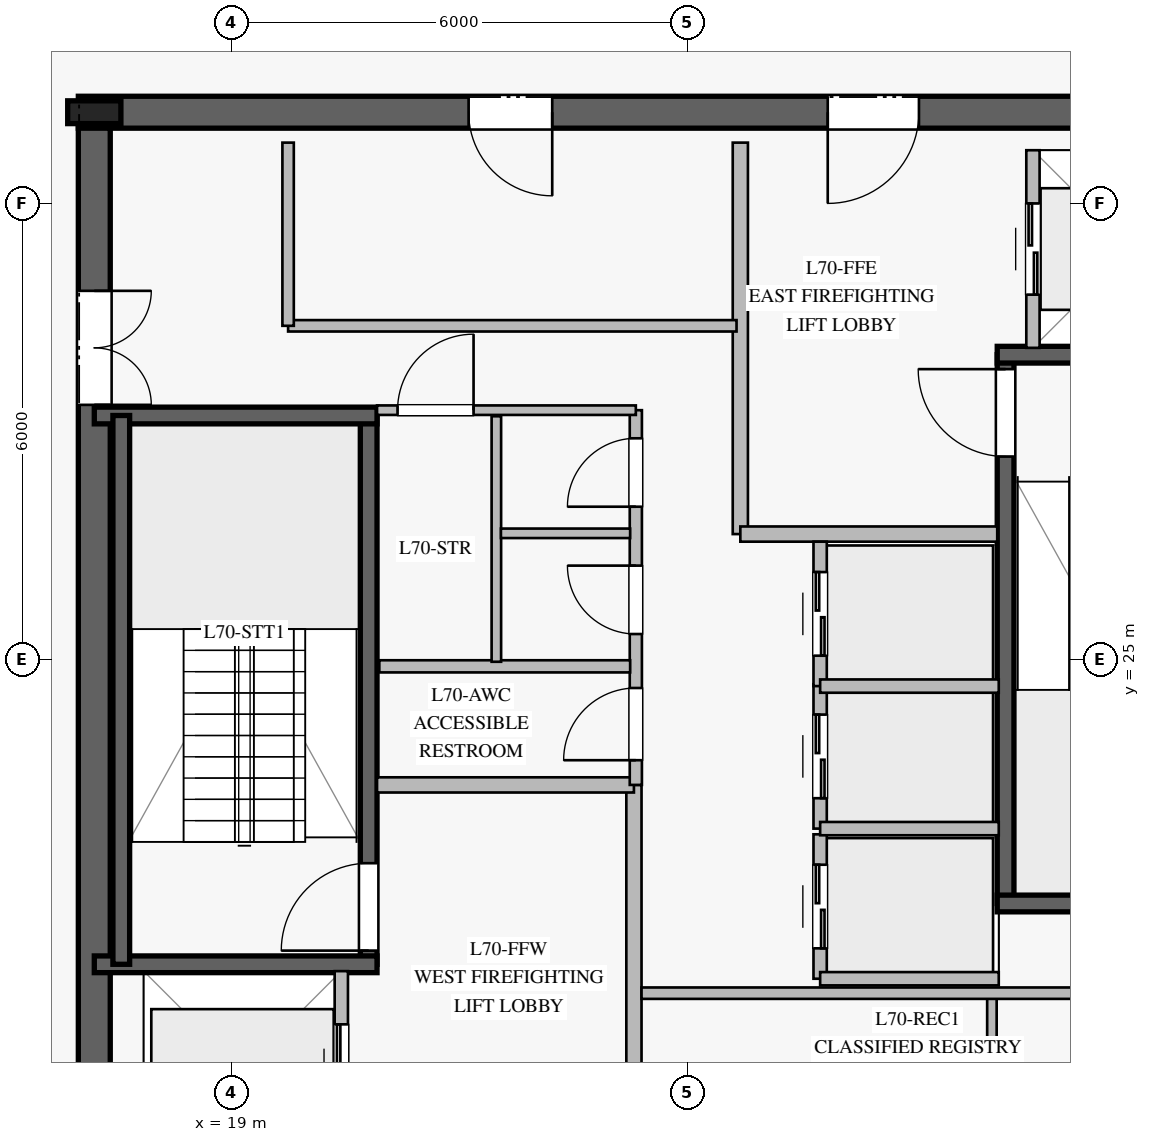
"""IFC4 building model, lengths in metres.
Left out: names, types, materials, properties, quantities, classifications, styles, units other than length and angle.
Written with IfcOpenShell. Run it as: python <this file> out.ifc"""

import sys

from ifc_helpers import new_model, si_unit, direction, frame, frame_2d, origin, origin_2d, place, context, subcontext, project, spatial, rectangle, i_section, extrude, element, fill, save


model = new_model("IFC4")
c1 = context("Model", 3, precision=1e-05, world=origin(), true_north=direction((0.0, 1.0)))
c2 = subcontext(c1, "Body", "Model", "MODEL_VIEW")
j1 = project(units=[si_unit("LENGTHUNIT", "METRE"), si_unit("PLANEANGLEUNIT", "RADIAN")], contexts=[c1])
p1 = place(None, origin())
s1 = spatial("IfcSite", under=j1, at=p1, CompositionType="ELEMENT")
p2 = place(p1, origin())
s2 = spatial("IfcBuilding", under=s1, at=p2, CompositionType="ELEMENT")
p3 = place(p2, frame((0.0, 0.0, 290.2)))
s3 = spatial("IfcBuildingStorey", under=s2, at=p3, CompositionType="ELEMENT", Elevation=290.2)
p4 = place(p3, frame((33.01, 32.2, 0.0), z_axis=(0.0, 0.0, 1.0), x_axis=(-1.0, 0.0, 0.0)))
e1 = element("IfcWall", 1, at=p4, inside=s3, PredefinedType="SHEAR", context=c2, shape_type="SweptSolid", body=[
    extrude(rectangle(XDim=16.02, YDim=0.42, at=frame_2d((8.01, 0.0))), origin(), (0.0, 0.0, 1.0), 3.78),
])
p5 = place(p4, frame((4.96, 0.0, 0.0)))
e2 = element("IfcOpeningElement", 2, at=p5, cuts=e1, PredefinedType="OPENING", context=c2, shape_type="SweptSolid", body=[
    extrude(rectangle(XDim=1.2, YDim=2.25, at=frame_2d((0.6, 1.125))), frame((0.0, 0.22, 0.0), z_axis=(0.0, -1.0, 0.0), x_axis=(1.0, 0.0, 0.0)), (0.0, 0.0, 1.0), 0.44),
])
p6 = place(p4, frame((9.785, 0.0, 0.0)))
e3 = element("IfcOpeningElement", 3, at=p6, cuts=e1, PredefinedType="OPENING", context=c2, shape_type="SweptSolid", body=[
    extrude(rectangle(XDim=1.1, YDim=2.2, at=frame_2d((0.55, 1.1))), frame((0.0, 0.22, 0.0), z_axis=(0.0, -1.0, 0.0), x_axis=(1.0, 0.0, 0.0)), (0.0, 0.0, 1.0), 0.44),
])
p7 = place(p3, frame((17.2, 31.99, 0.0), z_axis=(0.0, 0.0, 1.0), x_axis=(0.0, -1.0, 0.0)))
e4 = element("IfcWall", 4, at=p7, inside=s3, PredefinedType="SHEAR", context=c2, shape_type="SweptSolid", body=[
    extrude(rectangle(XDim=13.98, YDim=0.42, at=frame_2d((6.99, 0.0))), origin(), (0.0, 0.0, 1.0), 3.78),
])
p8 = place(p7, frame((2.14, 0.0, 0.0)))
e5 = element("IfcOpeningElement", 5, at=p8, cuts=e4, PredefinedType="OPENING", context=c2, shape_type="SweptSolid", body=[
    extrude(rectangle(XDim=1.5, YDim=2.2, at=frame_2d((0.75, 1.1))), frame((0.0, 0.22, 0.0), z_axis=(0.0, -1.0, 0.0), x_axis=(1.0, 0.0, 0.0)), (0.0, 0.0, 1.0), 0.44),
])
p9 = place(p3, frame((17.2, 32.2, 0.0), z_axis=(0.0, 0.0, 1.0), x_axis=(1.0, 0.0, 0.0)))
e6 = element("IfcColumn", 6, at=p9, inside=s3, PredefinedType="COLUMN", context=c2, shape_type="SweptSolid", body=[
    extrude(i_section(OverallWidth=0.3, OverallDepth=0.7, WebThickness=0.017, FlangeThickness=0.032, at=origin_2d()), origin(), (0.0, 0.0, 1.0), 4.0),
])
p10 = place(p3, frame((20.81, 20.99, 0.0), z_axis=(0.0, 0.0, 1.0), x_axis=(0.0, 1.0, 0.0)))
e7 = element("IfcWall", 7, at=p10, inside=s3, PredefinedType="SOLIDWALL", context=c2, shape_type="SweptSolid", body=[
    extrude(rectangle(XDim=7.22, YDim=0.22, at=frame_2d((3.61, 0.0))), origin(), (0.0, 0.0, 1.0), 3.78),
])
p11 = place(p10, frame((0.18, 0.0, 0.0)))
e8 = element("IfcOpeningElement", 8, at=p11, cuts=e7, PredefinedType="OPENING", context=c2, shape_type="SweptSolid", body=[
    extrude(rectangle(XDim=1.15, YDim=2.2, at=frame_2d((0.575, 1.1))), frame((0.0, 0.12, 0.0), z_axis=(0.0, -1.0, 0.0), x_axis=(1.0, 0.0, 0.0)), (0.0, 0.0, 1.0), 0.24),
])
for number, where, z_axis, x_axis in (
    (9, (17.2, 20.99, 0.0), (0.0, 0.0, 1.0), (1.0, 0.0, 0.0)),
    (10, (17.2, 28.21, 0.0), (0.0, 0.0, 1.0), (1.0, 0.0, 0.0)),
):
    element("IfcWall", number, at=place(p3, frame(where, z_axis=z_axis, x_axis=x_axis)), inside=s3, PredefinedType="SOLIDWALL", context=c2, shape_type="SweptSolid", body=[
        extrude(rectangle(XDim=3.72, YDim=0.22, at=frame_2d((1.86, 0.0))), origin(), (0.0, 0.0, 1.0), 3.78),
    ])
p12 = place(p3, frame((17.555, 28.21, 0.0), z_axis=(0.0, 0.0, 1.0), x_axis=(0.0, -1.0, 0.0)))
e11 = element("IfcWall", 11, at=p12, inside=s3, PredefinedType="SOLIDWALL", context=c2, shape_type="SweptSolid", body=[
    extrude(rectangle(XDim=7.22, YDim=0.22, at=frame_2d((3.61, 0.0))), origin(), (0.0, 0.0, 1.0), 3.78),
])
p13 = place(p3, frame((29.19, 21.79, 0.0), z_axis=(0.0, 0.0, 1.0), x_axis=(0.0, 1.0, 0.0)))
e12 = element("IfcWall", 12, at=p13, inside=s3, PredefinedType="SOLIDWALL", context=c2, shape_type="SweptSolid", body=[
    extrude(rectangle(XDim=7.22, YDim=0.22, at=frame_2d((3.61, 0.0))), origin(), (0.0, 0.0, 1.0), 3.78),
])
p14 = place(p13, frame((5.88, 0.0, 0.0)))
e13 = element("IfcOpeningElement", 13, at=p14, cuts=e12, PredefinedType="OPENING", context=c2, shape_type="SweptSolid", body=[
    extrude(rectangle(XDim=1.15, YDim=2.2, at=frame_2d((0.575, 1.1))), frame((0.0, 0.12, 0.0), z_axis=(0.0, -1.0, 0.0), x_axis=(1.0, 0.0, 0.0)), (0.0, 0.0, 1.0), 0.24),
])
for number, where, z_axis, x_axis in (
    (14, (29.08, 21.79, 0.0), (0.0, 0.0, 1.0), (1.0, 0.0, 0.0)),
    (15, (29.08, 29.01, 0.0), (0.0, 0.0, 1.0), (1.0, 0.0, 0.0)),
):
    element("IfcWall", number, at=place(p3, frame(where, z_axis=z_axis, x_axis=x_axis)), inside=s3, PredefinedType="SOLIDWALL", context=c2, shape_type="SweptSolid", body=[
        extrude(rectangle(XDim=3.72, YDim=0.22, at=frame_2d((1.86, 0.0))), origin(), (0.0, 0.0, 1.0), 3.78),
    ])
p15 = place(p3, frame((24.3, 18.2, 0.0), z_axis=(0.0, 0.0, 1.0), x_axis=(0.0, 1.0, 0.0)))
e16 = element("IfcWall", 16, at=p15, inside=s3, PredefinedType="PARTITIONING", context=c2, shape_type="SweptSolid", body=[
    extrude(rectangle(XDim=5.15, YDim=0.2, at=frame_2d((2.575, 0.0))), origin(), (0.0, 0.0, 1.0), 3.78),
])
p16 = place(p3, frame((20.92, 23.35, 0.0), z_axis=(0.0, 0.0, 1.0), x_axis=(1.0, 0.0, 0.0)))
e17 = element("IfcWall", 17, at=p16, inside=s3, PredefinedType="PARTITIONING", context=c2, shape_type="SweptSolid", body=[
    extrude(rectangle(XDim=3.38, YDim=0.2, at=frame_2d((1.69, 0.0))), origin(), (0.0, 0.0, 1.0), 3.78),
])
p17 = place(p3, frame((25.7, 26.65, 0.0), z_axis=(0.0, 0.0, 1.0), x_axis=(0.0, 1.0, 0.0)))
e18 = element("IfcWall", 18, at=p17, inside=s3, PredefinedType="PARTITIONING", context=c2, shape_type="SweptSolid", body=[
    extrude(rectangle(XDim=5.15, YDim=0.2, at=frame_2d((2.575, 0.0))), origin(), (0.0, 0.0, 1.0), 3.78),
])
p18 = place(p3, frame((25.7, 26.65, 0.0), z_axis=(0.0, 0.0, 1.0), x_axis=(1.0, 0.0, 0.0)))
e19 = element("IfcWall", 19, at=p18, inside=s3, PredefinedType="PARTITIONING", context=c2, shape_type="SweptSolid", body=[
    extrude(rectangle(XDim=3.38, YDim=0.2, at=frame_2d((1.69, 0.0))), origin(), (0.0, 0.0, 1.0), 3.78),
])
p19 = place(p3, frame((24.325, 23.35, 0.0), z_axis=(0.0, 0.0, 1.0), x_axis=(0.0, 1.0, 0.0)))
e20 = element("IfcWall", 20, at=p19, inside=s3, PredefinedType="PLUMBINGWALL", context=c2, shape_type="SweptSolid", body=[
    extrude(rectangle(XDim=4.93, YDim=0.16, at=frame_2d((2.465, 0.0))), origin(), (0.0, 0.0, 1.0), 3.78),
])
p20 = place(p19, frame((0.325, 0.0, 0.0)))
e21 = element("IfcOpeningElement", 21, at=p20, cuts=e20, PredefinedType="OPENING", context=c2, shape_type="SweptSolid", body=[
    extrude(rectangle(XDim=0.95, YDim=2.1, at=frame_2d((0.475, 1.05))), frame((0.0, 0.09, 0.0), z_axis=(0.0, -1.0, 0.0), x_axis=(1.0, 0.0, 0.0)), (0.0, 0.0, 1.0), 0.18),
])
p21 = place(p19, frame((1.985, 0.0, 0.0)))
e22 = element("IfcOpeningElement", 22, at=p21, cuts=e20, PredefinedType="OPENING", context=c2, shape_type="SweptSolid", body=[
    extrude(rectangle(XDim=0.9, YDim=2.1, at=frame_2d((0.45, 1.05))), frame((0.0, 0.09, 0.0), z_axis=(0.0, -1.0, 0.0), x_axis=(1.0, 0.0, 0.0)), (0.0, 0.0, 1.0), 0.18),
])
p22 = place(p19, frame((3.66, 0.0, 0.0)))
e23 = element("IfcOpeningElement", 23, at=p22, cuts=e20, PredefinedType="OPENING", context=c2, shape_type="SweptSolid", body=[
    extrude(rectangle(XDim=0.9, YDim=2.1, at=frame_2d((0.45, 1.05))), frame((0.0, 0.09, 0.0), z_axis=(0.0, -1.0, 0.0), x_axis=(1.0, 0.0, 0.0)), (0.0, 0.0, 1.0), 0.18),
])
p23 = place(p3, frame((20.92, 28.28, 0.0), z_axis=(0.0, 0.0, 1.0), x_axis=(1.0, 0.0, 0.0)))
e24 = element("IfcWall", 24, at=p23, inside=s3, PredefinedType="PARTITIONING", context=c2, shape_type="SweptSolid", body=[
    extrude(rectangle(XDim=3.405, YDim=0.125, at=frame_2d((1.703, 0.0))), origin(), (0.0, 0.0, 1.0), 3.78),
])
p24 = place(p23, frame((0.27, 0.0, 0.0)))
e25 = element("IfcOpeningElement", 25, at=p24, cuts=e24, PredefinedType="OPENING", context=c2, shape_type="SweptSolid", body=[
    extrude(rectangle(XDim=1.0, YDim=2.15, at=frame_2d((0.5, 1.075))), frame((0.0, 0.073, 0.0), z_axis=(0.0, -1.0, 0.0), x_axis=(1.0, 0.0, 0.0)), (0.0, 0.0, 1.0), 0.145),
])
p25 = place(p3, frame((29.01, 18.01, 0.0), z_axis=(0.0, 0.0, 1.0), x_axis=(0.0, 1.0, 0.0)))
e26 = element("IfcWall", 26, at=p25, inside=s3, PredefinedType="PARTITIONING", context=c2, shape_type="SweptSolid", body=[
    extrude(rectangle(XDim=2.54, YDim=0.125, at=frame_2d((1.27, 0.0))), origin(), (0.0, 0.0, 1.0), 3.78),
])
p26 = place(p3, frame((20.95, 24.91, 0.0), z_axis=(0.0, 0.0, 1.0), x_axis=(1.0, 0.0, 0.0)))
e27 = element("IfcWall", 27, at=p26, inside=s3, PredefinedType="PLUMBINGWALL", context=c2, shape_type="SweptSolid", body=[
    extrude(rectangle(XDim=3.3, YDim=0.16, at=frame_2d((1.65, 0.0))), origin(), (0.0, 0.0, 1.0), 3.78),
])
p27 = place(p3, frame((22.49, 24.97, 0.0), z_axis=(0.0, 0.0, 1.0), x_axis=(0.0, 1.0, 0.0)))
e28 = element("IfcWall", 28, at=p27, inside=s3, PredefinedType="PARTITIONING", context=c2, shape_type="SweptSolid", body=[
    extrude(rectangle(XDim=3.23, YDim=0.125, at=frame_2d((1.615, 0.0))), origin(), (0.0, 0.0, 1.0), 3.78),
])
p28 = place(p3, frame((22.55, 26.66, 0.0), z_axis=(0.0, 0.0, 1.0), x_axis=(1.0, 0.0, 0.0)))
e29 = element("IfcWall", 29, at=p28, inside=s3, PredefinedType="PARTITIONING", context=c2, shape_type="SweptSolid", body=[
    extrude(rectangle(XDim=1.7, YDim=0.125, at=frame_2d((0.85, 0.0))), origin(), (0.0, 0.0, 1.0), 3.78),
])
p29 = place(p3, frame((24.4, 20.61, 0.0), z_axis=(0.0, 0.0, 1.0), x_axis=(1.0, 0.0, 0.0)))
e30 = element("IfcWall", 30, at=p29, inside=s3, PredefinedType="PARTITIONING", context=c2, shape_type="SweptSolid", body=[
    extrude(rectangle(XDim=5.9, YDim=0.15, at=frame_2d((2.95, 0.0))), origin(), (0.0, 0.0, 1.0), 3.78),
])
p30 = place(p3, frame((19.75, 29.39, 0.0), z_axis=(0.0, 0.0, 1.0), x_axis=(1.0, 0.0, 0.0)))
e31 = element("IfcWall", 31, at=p30, inside=s3, PredefinedType="PARTITIONING", context=c2, shape_type="SweptSolid", body=[
    extrude(rectangle(XDim=5.9, YDim=0.15, at=frame_2d((2.95, 0.0))), origin(), (0.0, 0.0, 1.0), 3.78),
])
p31 = place(p3, frame((19.75, 29.39, 0.0), z_axis=(0.0, 0.0, 1.0), x_axis=(0.0, 1.0, 0.0)))
e32 = element("IfcWall", 32, at=p31, inside=s3, PredefinedType="PARTITIONING", context=c2, shape_type="SweptSolid", body=[
    extrude(rectangle(XDim=2.41, YDim=0.15, at=frame_2d((1.205, 0.0))), origin(), (0.0, 0.0, 1.0), 3.78),
])
p32 = place(p3, frame((26.75, 20.8, 0.0), z_axis=(0.0, 0.0, 1.0), x_axis=(0.0, 1.0, 0.0)))
e33 = element("IfcWall", 33, at=p32, inside=s3, PredefinedType="PARTITIONING", context=c2, shape_type="SweptSolid", body=[
    extrude(rectangle(XDim=1.9, YDim=0.175, at=frame_2d((0.95, 0.0))), origin(), (0.0, 0.0, 1.0), 3.78),
])
p33 = place(p32, frame((0.4, 0.0, 0.0)))
e34 = element("IfcOpeningElement", 34, at=p33, cuts=e33, PredefinedType="OPENING", context=c2, shape_type="SweptSolid", body=[
    extrude(rectangle(XDim=1.1, YDim=2.2, at=frame_2d((0.55, 1.1))), frame((0.0, 0.098, 0.0), z_axis=(0.0, -1.0, 0.0), x_axis=(1.0, 0.0, 0.0)), (0.0, 0.0, 1.0), 0.195),
])
p34 = place(p3, frame((26.75, 20.8, 0.0), z_axis=(0.0, 0.0, 1.0), x_axis=(1.0, 0.0, 0.0)))
e35 = element("IfcWall", 35, at=p34, inside=s3, PredefinedType="PARTITIONING", context=c2, shape_type="SweptSolid", body=[
    extrude(rectangle(XDim=2.35, YDim=0.175, at=frame_2d((1.175, 0.0))), origin(), (0.0, 0.0, 1.0), 3.78),
])
p35 = place(p3, frame((26.75, 22.775, 0.0), z_axis=(0.0, 0.0, 1.0), x_axis=(0.0, 1.0, 0.0)))
e36 = element("IfcWall", 36, at=p35, inside=s3, PredefinedType="PARTITIONING", context=c2, shape_type="SweptSolid", body=[
    extrude(rectangle(XDim=1.9, YDim=0.175, at=frame_2d((0.95, 0.0))), origin(), (0.0, 0.0, 1.0), 3.78),
])
p36 = place(p35, frame((0.4, 0.0, 0.0)))
e37 = element("IfcOpeningElement", 37, at=p36, cuts=e36, PredefinedType="OPENING", context=c2, shape_type="SweptSolid", body=[
    extrude(rectangle(XDim=1.1, YDim=2.2, at=frame_2d((0.55, 1.1))), frame((0.0, 0.098, 0.0), z_axis=(0.0, -1.0, 0.0), x_axis=(1.0, 0.0, 0.0)), (0.0, 0.0, 1.0), 0.195),
])
p37 = place(p3, frame((26.75, 22.775, 0.0), z_axis=(0.0, 0.0, 1.0), x_axis=(1.0, 0.0, 0.0)))
e38 = element("IfcWall", 38, at=p37, inside=s3, PredefinedType="PARTITIONING", context=c2, shape_type="SweptSolid", body=[
    extrude(rectangle(XDim=2.35, YDim=0.175, at=frame_2d((1.175, 0.0))), origin(), (0.0, 0.0, 1.0), 3.78),
])
p38 = place(p3, frame((26.75, 24.65, 0.0), z_axis=(0.0, 0.0, 1.0), x_axis=(0.0, 1.0, 0.0)))
e39 = element("IfcWall", 39, at=p38, inside=s3, PredefinedType="PARTITIONING", context=c2, shape_type="SweptSolid", body=[
    extrude(rectangle(XDim=1.9, YDim=0.175, at=frame_2d((0.95, 0.0))), origin(), (0.0, 0.0, 1.0), 3.78),
])
p39 = place(p38, frame((0.4, 0.0, 0.0)))
e40 = element("IfcOpeningElement", 40, at=p39, cuts=e39, PredefinedType="OPENING", context=c2, shape_type="SweptSolid", body=[
    extrude(rectangle(XDim=1.1, YDim=2.2, at=frame_2d((0.55, 1.1))), frame((0.0, 0.098, 0.0), z_axis=(0.0, -1.0, 0.0), x_axis=(1.0, 0.0, 0.0)), (0.0, 0.0, 1.0), 0.195),
])
p40 = place(p3, frame((26.75, 24.65, 0.0), z_axis=(0.0, 0.0, 1.0), x_axis=(1.0, 0.0, 0.0)))
e41 = element("IfcWall", 41, at=p40, inside=s3, PredefinedType="PARTITIONING", context=c2, shape_type="SweptSolid", body=[
    extrude(rectangle(XDim=2.35, YDim=0.175, at=frame_2d((1.175, 0.0))), origin(), (0.0, 0.0, 1.0), 3.78),
])
p41 = place(p3, frame((20.45, 18.3, 0.0), z_axis=(0.0, 0.0, 1.0), x_axis=(0.0, 1.0, 0.0)))
e42 = element("IfcWall", 42, at=p41, inside=s3, PredefinedType="PARTITIONING", context=c2, shape_type="SweptSolid", body=[
    extrude(rectangle(XDim=2.6, YDim=0.175, at=frame_2d((1.3, 0.0))), origin(), (0.0, 0.0, 1.0), 3.78),
])
p42 = place(p41, frame((0.7, 0.0, 0.0)))
e43 = element("IfcOpeningElement", 43, at=p42, cuts=e42, PredefinedType="OPENING", context=c2, shape_type="SweptSolid", body=[
    extrude(rectangle(XDim=1.2, YDim=2.2, at=frame_2d((0.6, 1.1))), frame((0.0, 0.098, 0.0), z_axis=(0.0, -1.0, 0.0), x_axis=(1.0, 0.0, 0.0)), (0.0, 0.0, 1.0), 0.195),
])
p43 = place(p3, frame((29.55, 29.1, 0.0), z_axis=(0.0, 0.0, 1.0), x_axis=(0.0, 1.0, 0.0)))
e44 = element("IfcWall", 44, at=p43, inside=s3, PredefinedType="PARTITIONING", context=c2, shape_type="SweptSolid", body=[
    extrude(rectangle(XDim=2.6, YDim=0.175, at=frame_2d((1.3, 0.0))), origin(), (0.0, 0.0, 1.0), 3.78),
])
p44 = place(p43, frame((0.7, 0.0, 0.0)))
e45 = element("IfcOpeningElement", 45, at=p44, cuts=e44, PredefinedType="OPENING", context=c2, shape_type="SweptSolid", body=[
    extrude(rectangle(XDim=1.2, YDim=2.2, at=frame_2d((0.6, 1.1))), frame((0.0, 0.098, 0.0), z_axis=(0.0, -1.0, 0.0), x_axis=(1.0, 0.0, 0.0)), (0.0, 0.0, 1.0), 0.195),
])
p45 = place(p11, origin())
e46 = element("IfcDoor", 46, at=p45, inside=s3, OperationType="SINGLE_SWING_LEFT", PredefinedType="DOOR", context=c2, shape_type="SweptSolid", body=[
    extrude(rectangle(XDim=1.15, YDim=2.2, at=frame_2d((0.575, 1.1))), frame((0.0, 0.025, 0.0), z_axis=(0.0, -1.0, 0.0), x_axis=(1.0, 0.0, 0.0)), (0.0, 0.0, 1.0), 0.05),
])
fill(e8, e46)
p46 = place(p14, origin())
e47 = element("IfcDoor", 47, at=p46, inside=s3, OperationType="SINGLE_SWING_RIGHT", PredefinedType="DOOR", context=c2, shape_type="SweptSolid", body=[
    extrude(rectangle(XDim=1.15, YDim=2.2, at=frame_2d((0.575, 1.1))), frame((0.0, 0.025, 0.0), z_axis=(0.0, -1.0, 0.0), x_axis=(1.0, 0.0, 0.0)), (0.0, 0.0, 1.0), 0.05),
])
fill(e13, e47)
p47 = place(p5, origin())
e48 = element("IfcDoor", 48, at=p47, inside=s3, OperationType="SINGLE_SWING_RIGHT", PredefinedType="DOOR", context=c2, shape_type="SweptSolid", body=[
    extrude(rectangle(XDim=1.2, YDim=2.25, at=frame_2d((0.6, 1.125))), frame((0.0, 0.025, 0.0), z_axis=(0.0, -1.0, 0.0), x_axis=(1.0, 0.0, 0.0)), (0.0, 0.0, 1.0), 0.05),
])
fill(e2, e48)
p48 = place(p8, origin())
e49 = element("IfcDoor", 49, at=p48, inside=s3, OperationType="DOUBLE_DOOR_SINGLE_SWING", PredefinedType="DOOR", context=c2, shape_type="SweptSolid", body=[
    extrude(rectangle(XDim=1.5, YDim=2.2, at=frame_2d((0.75, 1.1))), frame((0.0, 0.025, 0.0), z_axis=(0.0, -1.0, 0.0), x_axis=(1.0, 0.0, 0.0)), (0.0, 0.0, 1.0), 0.05),
])
fill(e5, e49)
p49 = place(p20, origin())
e50 = element("IfcDoor", 50, at=p49, inside=s3, OperationType="SINGLE_SWING_LEFT", PredefinedType="DOOR", context=c2, shape_type="SweptSolid", body=[
    extrude(rectangle(XDim=0.95, YDim=2.1, at=frame_2d((0.475, 1.05))), frame((0.0, 0.025, 0.0), z_axis=(0.0, -1.0, 0.0), x_axis=(1.0, 0.0, 0.0)), (0.0, 0.0, 1.0), 0.05),
])
fill(e21, e50)
p50 = place(p21, origin())
e51 = element("IfcDoor", 51, at=p50, inside=s3, OperationType="SINGLE_SWING_RIGHT", PredefinedType="DOOR", context=c2, shape_type="SweptSolid", body=[
    extrude(rectangle(XDim=0.9, YDim=2.1, at=frame_2d((0.45, 1.05))), frame((0.0, 0.025, 0.0), z_axis=(0.0, -1.0, 0.0), x_axis=(1.0, 0.0, 0.0)), (0.0, 0.0, 1.0), 0.05),
])
fill(e22, e51)
p51 = place(p22, origin())
e52 = element("IfcDoor", 52, at=p51, inside=s3, OperationType="SINGLE_SWING_LEFT", PredefinedType="DOOR", context=c2, shape_type="SweptSolid", body=[
    extrude(rectangle(XDim=0.9, YDim=2.1, at=frame_2d((0.45, 1.05))), frame((0.0, 0.025, 0.0), z_axis=(0.0, -1.0, 0.0), x_axis=(1.0, 0.0, 0.0)), (0.0, 0.0, 1.0), 0.05),
])
fill(e23, e52)
p52 = place(p24, origin())
e53 = element("IfcDoor", 53, at=p52, inside=s3, OperationType="SINGLE_SWING_RIGHT", PredefinedType="DOOR", context=c2, shape_type="SweptSolid", body=[
    extrude(rectangle(XDim=1.0, YDim=2.15, at=frame_2d((0.5, 1.075))), frame((0.0, 0.025, 0.0), z_axis=(0.0, -1.0, 0.0), x_axis=(1.0, 0.0, 0.0)), (0.0, 0.0, 1.0), 0.05),
])
fill(e25, e53)
p53 = place(p6, origin())
e54 = element("IfcDoor", 54, at=p53, inside=s3, OperationType="SINGLE_SWING_LEFT", PredefinedType="DOOR", context=c2, shape_type="SweptSolid", body=[
    extrude(rectangle(XDim=1.1, YDim=2.2, at=frame_2d((0.55, 1.1))), frame((0.0, 0.025, 0.0), z_axis=(0.0, -1.0, 0.0), x_axis=(1.0, 0.0, 0.0)), (0.0, 0.0, 1.0), 0.05),
])
fill(e3, e54)
p54 = place(p33, origin())
e55 = element("IfcDoor", 55, at=p54, inside=s3, OperationType="DOUBLE_DOOR_SLIDING", PredefinedType="DOOR", context=c2, shape_type="SweptSolid", body=[
    extrude(rectangle(XDim=1.1, YDim=2.2, at=frame_2d((0.55, 1.1))), frame((0.0, 0.025, 0.0), z_axis=(0.0, -1.0, 0.0), x_axis=(1.0, 0.0, 0.0)), (0.0, 0.0, 1.0), 0.05),
])
fill(e34, e55)
p55 = place(p36, origin())
e56 = element("IfcDoor", 56, at=p55, inside=s3, OperationType="DOUBLE_DOOR_SLIDING", PredefinedType="DOOR", context=c2, shape_type="SweptSolid", body=[
    extrude(rectangle(XDim=1.1, YDim=2.2, at=frame_2d((0.55, 1.1))), frame((0.0, 0.025, 0.0), z_axis=(0.0, -1.0, 0.0), x_axis=(1.0, 0.0, 0.0)), (0.0, 0.0, 1.0), 0.05),
])
fill(e37, e56)
p56 = place(p39, origin())
e57 = element("IfcDoor", 57, at=p56, inside=s3, OperationType="DOUBLE_DOOR_SLIDING", PredefinedType="DOOR", context=c2, shape_type="SweptSolid", body=[
    extrude(rectangle(XDim=1.1, YDim=2.2, at=frame_2d((0.55, 1.1))), frame((0.0, 0.025, 0.0), z_axis=(0.0, -1.0, 0.0), x_axis=(1.0, 0.0, 0.0)), (0.0, 0.0, 1.0), 0.05),
])
fill(e40, e57)
p57 = place(p42, origin())
e58 = element("IfcDoor", 58, at=p57, inside=s3, OperationType="DOUBLE_DOOR_SLIDING", PredefinedType="DOOR", context=c2, shape_type="SweptSolid", body=[
    extrude(rectangle(XDim=1.2, YDim=2.2, at=frame_2d((0.6, 1.1))), frame((0.0, 0.025, 0.0), z_axis=(0.0, -1.0, 0.0), x_axis=(1.0, 0.0, 0.0)), (0.0, 0.0, 1.0), 0.05),
])
fill(e43, e58)
p58 = place(p44, origin())
e59 = element("IfcDoor", 59, at=p58, inside=s3, OperationType="DOUBLE_DOOR_SLIDING", PredefinedType="DOOR", context=c2, shape_type="SweptSolid", body=[
    extrude(rectangle(XDim=1.2, YDim=2.2, at=frame_2d((0.6, 1.1))), frame((0.0, 0.025, 0.0), z_axis=(0.0, -1.0, 0.0), x_axis=(1.0, 0.0, 0.0)), (0.0, 0.0, 1.0), 0.05),
])
fill(e45, e59)
save(model, sys.argv[1])
